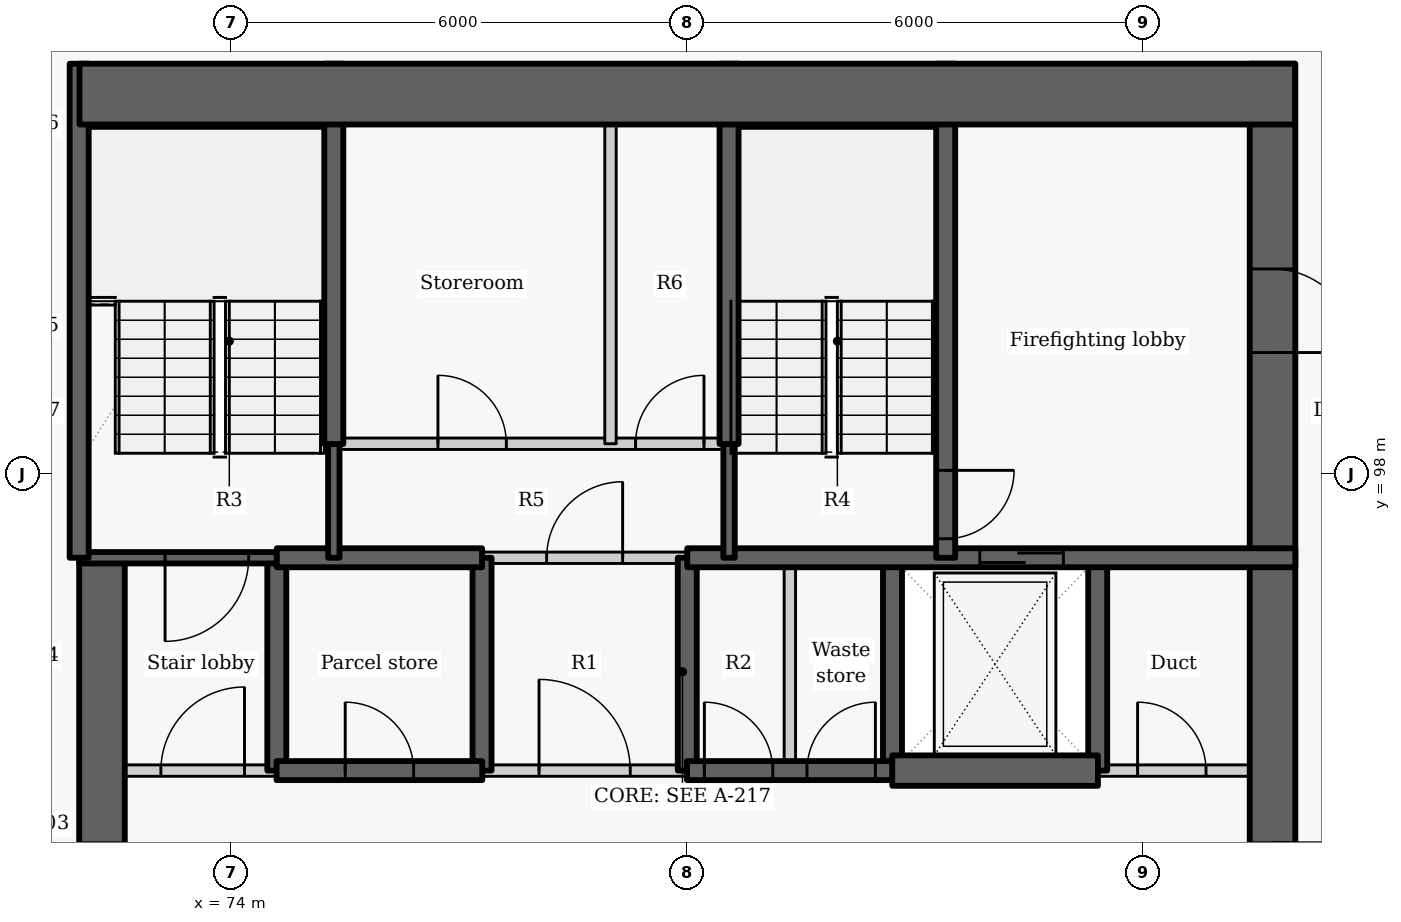
"""IFC4 building model, lengths in metres.
Left out: names, types, materials, properties, quantities, classifications, styles, units other than length and angle.
Written with IfcOpenShell. Run it as: python <this file> out.ifc"""

import sys

from ifc_helpers import new_model, si_unit, direction, frame, frame_2d, origin, place, context, subcontext, project, spatial, rectangle, extrude, element, fill, save


model = new_model("IFC4")
c1 = context("Model", 3, precision=1e-05, world=origin(), true_north=direction((0.0, 1.0)))
c2 = subcontext(c1, "Body", "Model", "MODEL_VIEW")
j1 = project(units=[si_unit("LENGTHUNIT", "METRE"), si_unit("PLANEANGLEUNIT", "RADIAN")], contexts=[c1])
p1 = place(None, origin())
s1 = spatial("IfcSite", under=j1, at=p1, CompositionType="ELEMENT")
p2 = place(p1, origin())
s2 = spatial("IfcBuilding", under=s1, at=p2, CompositionType="ELEMENT")
p3 = place(p2, frame((0.0, 0.0, 81.0)))
s3 = spatial("IfcBuildingStorey", under=s2, at=p3, CompositionType="ELEMENT", Elevation=81.0)
p4 = place(p3, frame((74.6, 94.1, -0.275), z_axis=(0.0, 0.0, 1.0), x_axis=(0.0, 1.0, 0.0)))
e1 = element("IfcWall", 1, at=p4, inside=s3, PredefinedType="SHEAR", context=c2, shape_type="SweptSolid", body=[
    extrude(rectangle(XDim=2.8, YDim=0.25, at=frame_2d((1.4, 0.0))), origin(), (0.0, 0.0, 1.0), 3.3),
])
p5 = place(p3, frame((72.3, 87.8, -0.275), z_axis=(0.0, 0.0, 1.0), x_axis=(0.0, 1.0, 0.0)))
e2 = element("IfcWall", 2, at=p5, inside=s3, PredefinedType="SHEAR", context=c2, shape_type="SweptSolid", body=[
    extrude(rectangle(XDim=9.1, YDim=0.6, at=frame_2d((4.55, 0.0))), origin(), (0.0, 0.0, 1.0), 3.3),
])
p6 = place(p5, frame((3.85, 0.0, 0.275)))
e3 = element("IfcOpeningElement", 3, at=p6, cuts=e2, PredefinedType="OPENING", context=c2, shape_type="SweptSolid", body=[
    extrude(rectangle(XDim=1.5, YDim=2.1, at=frame_2d((0.75, 1.05))), frame((0.0, 0.31, 0.0), z_axis=(0.0, -1.0, 0.0), x_axis=(1.0, 0.0, 0.0)), (0.0, 0.0, 1.0), 0.62),
])
for number, where, z_axis, x_axis in (
    (4, (77.3, 94.1, -0.275), (0.0, 0.0, 1.0), (0.0, 1.0, 0.0)),
    (5, (80.0, 94.1, -0.275), (0.0, 0.0, 1.0), (0.0, 1.0, 0.0)),
    (6, (82.7, 94.1, -0.275), (0.0, 0.0, 1.0), (0.0, 1.0, 0.0)),
    (7, (85.4, 94.1, -0.275), (0.0, 0.0, 1.0), (0.0, 1.0, 0.0)),
):
    element("IfcWall", number, at=place(p3, frame(where, z_axis=z_axis, x_axis=x_axis)), inside=s3, PredefinedType="SHEAR", context=c2, shape_type="SweptSolid", body=[
        extrude(rectangle(XDim=2.8, YDim=0.25, at=frame_2d((1.4, 0.0))), origin(), (0.0, 0.0, 1.0), 3.3),
    ])
p7 = place(p3, frame((87.7, 103.4, -0.275), z_axis=(0.0, 0.0, 1.0), x_axis=(0.0, -1.0, 0.0)))
e8 = element("IfcWall", 8, at=p7, inside=s3, PredefinedType="SHEAR", context=c2, shape_type="SweptSolid", body=[
    extrude(rectangle(XDim=15.6, YDim=0.6, at=frame_2d((7.8, 0.0))), origin(), (0.0, 0.0, 1.0), 3.3),
])
p8 = place(p7, frame((10.25, 0.0, 0.275)))
e9 = element("IfcOpeningElement", 9, at=p8, cuts=e8, PredefinedType="OPENING", context=c2, shape_type="SweptSolid", body=[
    extrude(rectangle(XDim=1.5, YDim=2.1, at=frame_2d((0.75, 1.05))), frame((0.0, 0.31, 0.0), z_axis=(0.0, -1.0, 0.0), x_axis=(1.0, 0.0, 0.0)), (0.0, 0.0, 1.0), 0.62),
])
p9 = place(p7, frame((2.7, 0.0, 0.275)))
e10 = element("IfcOpeningElement", 10, at=p9, cuts=e8, PredefinedType="OPENING", context=c2, shape_type="SweptSolid", body=[
    extrude(rectangle(XDim=1.1, YDim=2.1, at=frame_2d((0.55, 1.05))), frame((0.0, 0.31, 0.0), z_axis=(0.0, -1.0, 0.0), x_axis=(1.0, 0.0, 0.0)), (0.0, 0.0, 1.0), 0.62),
])
p10 = place(p3, frame((72.0, 94.1, 0.0), z_axis=(0.0, 0.0, 1.0), x_axis=(1.0, 0.0, 0.0)))
e11 = element("IfcWall", 11, at=p10, inside=s3, PredefinedType="PARTITIONING", context=c2, shape_type="SweptSolid", body=[
    extrude(rectangle(XDim=2.603, YDim=0.15, at=frame_2d((1.302, 0.0))), origin(), (0.0, 0.0, 1.0), 3.025),
])
p11 = place(p10, frame((1.075, 0.0, 0.0)))
e12 = element("IfcOpeningElement", 12, at=p11, cuts=e11, PredefinedType="OPENING", context=c2, shape_type="SweptSolid", body=[
    extrude(rectangle(XDim=1.1, YDim=2.1, at=frame_2d((0.55, 1.05))), frame((0.0, 0.085, 0.0), z_axis=(0.0, -1.0, 0.0), x_axis=(1.0, 0.0, 0.0)), (0.0, 0.0, 1.0), 0.17),
])
p12 = place(p3, frame((77.297, 94.1, 0.0), z_axis=(0.0, 0.0, 1.0), x_axis=(1.0, 0.0, 0.0)))
e13 = element("IfcWall", 13, at=p12, inside=s3, PredefinedType="PARTITIONING", context=c2, shape_type="SweptSolid", body=[
    extrude(rectangle(XDim=2.706, YDim=0.15, at=frame_2d((1.353, 0.0))), origin(), (0.0, 0.0, 1.0), 3.025),
])
p13 = place(p12, frame((0.753, 0.0, 0.0)))
e14 = element("IfcOpeningElement", 14, at=p13, cuts=e13, PredefinedType="OPENING", context=c2, shape_type="SweptSolid", body=[
    extrude(rectangle(XDim=1.2, YDim=2.1, at=frame_2d((0.6, 1.05))), frame((0.0, 0.085, 0.0), z_axis=(0.0, -1.0, 0.0), x_axis=(1.0, 0.0, 0.0)), (0.0, 0.0, 1.0), 0.17),
])
p14 = place(p3, frame((85.397, 94.1, 0.0), z_axis=(0.0, 0.0, 1.0), x_axis=(1.0, 0.0, 0.0)))
e15 = element("IfcWall", 15, at=p14, inside=s3, PredefinedType="PARTITIONING", context=c2, shape_type="SweptSolid", body=[
    extrude(rectangle(XDim=2.603, YDim=0.15, at=frame_2d((1.302, 0.0))), origin(), (0.0, 0.0, 1.0), 3.025),
])
p15 = place(p14, frame((0.528, 0.0, 0.0)))
e16 = element("IfcOpeningElement", 16, at=p15, cuts=e15, PredefinedType="OPENING", context=c2, shape_type="SweptSolid", body=[
    extrude(rectangle(XDim=0.9, YDim=2.1, at=frame_2d((0.45, 1.05))), frame((0.0, 0.085, 0.0), z_axis=(0.0, -1.0, 0.0), x_axis=(1.0, 0.0, 0.0)), (0.0, 0.0, 1.0), 0.17),
])
p16 = place(p3, frame((74.597, 94.1, -0.275), z_axis=(0.0, 0.0, 1.0), x_axis=(1.0, 0.0, 0.0)))
e17 = element("IfcWall", 17, at=p16, inside=s3, PredefinedType="SHEAR", context=c2, shape_type="SweptSolid", body=[
    extrude(rectangle(XDim=2.706, YDim=0.25, at=frame_2d((1.353, 0.0))), origin(), (0.0, 0.0, 1.0), 3.3),
])
p17 = place(p16, frame((0.903, 0.0, 0.275)))
e18 = element("IfcOpeningElement", 18, at=p17, cuts=e17, PredefinedType="OPENING", context=c2, shape_type="SweptSolid", body=[
    extrude(rectangle(XDim=0.9, YDim=2.1, at=frame_2d((0.45, 1.05))), frame((0.0, 0.135, 0.0), z_axis=(0.0, -1.0, 0.0), x_axis=(1.0, 0.0, 0.0)), (0.0, 0.0, 1.0), 0.27),
])
p18 = place(p3, frame((79.997, 94.1, -0.275), z_axis=(0.0, 0.0, 1.0), x_axis=(1.0, 0.0, 0.0)))
e19 = element("IfcWall", 19, at=p18, inside=s3, PredefinedType="SHEAR", context=c2, shape_type="SweptSolid", body=[
    extrude(rectangle(XDim=2.706, YDim=0.25, at=frame_2d((1.353, 0.0))), origin(), (0.0, 0.0, 1.0), 3.3),
])
p19 = place(p18, frame((0.228, 0.0, 0.275)))
e20 = element("IfcOpeningElement", 20, at=p19, cuts=e19, PredefinedType="OPENING", context=c2, shape_type="SweptSolid", body=[
    extrude(rectangle(XDim=0.9, YDim=2.1, at=frame_2d((0.45, 1.05))), frame((0.0, 0.135, 0.0), z_axis=(0.0, -1.0, 0.0), x_axis=(1.0, 0.0, 0.0)), (0.0, 0.0, 1.0), 0.27),
])
p20 = place(p18, frame((1.578, 0.0, 0.275)))
e21 = element("IfcOpeningElement", 21, at=p20, cuts=e19, PredefinedType="OPENING", context=c2, shape_type="SweptSolid", body=[
    extrude(rectangle(XDim=0.9, YDim=2.1, at=frame_2d((0.45, 1.05))), frame((0.0, 0.135, 0.0), z_axis=(0.0, -1.0, 0.0), x_axis=(1.0, 0.0, 0.0)), (0.0, 0.0, 1.0), 0.27),
])
p21 = place(p3, frame((82.697, 94.1, -0.275), z_axis=(0.0, 0.0, 1.0), x_axis=(1.0, 0.0, 0.0)))
e22 = element("IfcWall", 22, at=p21, inside=s3, PredefinedType="SHEAR", context=c2, shape_type="SweptSolid", body=[
    extrude(rectangle(XDim=2.706, YDim=0.4, at=frame_2d((1.353, 0.0))), origin(), (0.0, 0.0, 1.0), 3.3),
])
p22 = place(p3, frame((74.6, 96.9, -0.275), z_axis=(0.0, 0.0, 1.0), x_axis=(-1.0, 0.0, 0.0)))
e23 = element("IfcWall", 23, at=p22, inside=s3, PredefinedType="SHEAR", context=c2, shape_type="SweptSolid", body=[
    extrude(rectangle(XDim=2.6, YDim=0.15, at=frame_2d((1.3, 0.0))), origin(), (0.0, 0.0, 1.0), 3.3),
])
p23 = place(p22, frame((0.37, 0.0, 0.275)))
e24 = element("IfcOpeningElement", 24, at=p23, cuts=e23, PredefinedType="OPENING", context=c2, shape_type="SweptSolid", body=[
    extrude(rectangle(XDim=1.1, YDim=2.1, at=frame_2d((0.55, 1.05))), frame((0.0, 0.085, 0.0), z_axis=(0.0, -1.0, 0.0), x_axis=(1.0, 0.0, 0.0)), (0.0, 0.0, 1.0), 0.17),
])
p24 = place(p3, frame((74.6, 96.9, -0.275), z_axis=(0.0, 0.0, 1.0), x_axis=(1.0, 0.0, 0.0)))
e25 = element("IfcWall", 25, at=p24, inside=s3, PredefinedType="SHEAR", context=c2, shape_type="SweptSolid", body=[
    extrude(rectangle(XDim=2.7, YDim=0.25, at=frame_2d((1.35, 0.0))), origin(), (0.0, 0.0, 1.0), 3.3),
])
p25 = place(p3, frame((80.0, 96.9, -0.275), z_axis=(0.0, 0.0, 1.0), x_axis=(1.0, 0.0, 0.0)))
e26 = element("IfcWall", 26, at=p25, inside=s3, PredefinedType="SHEAR", context=c2, shape_type="SweptSolid", body=[
    extrude(rectangle(XDim=8.0, YDim=0.25, at=frame_2d((4.0, 0.0))), origin(), (0.0, 0.0, 1.0), 3.3),
])
p26 = place(p25, frame((3.849, 0.0, 0.275)))
e27 = element("IfcOpeningElement", 27, at=p26, cuts=e26, PredefinedType="OPENING", context=c2, shape_type="SweptSolid", body=[
    extrude(rectangle(XDim=1.1, YDim=2.1, at=frame_2d((0.55, 1.05))), frame((0.0, 0.135, 0.0), z_axis=(0.0, -1.0, 0.0), x_axis=(1.0, 0.0, 0.0)), (0.0, 0.0, 1.0), 0.27),
])
p27 = place(p3, frame((77.3, 96.9, 0.0), z_axis=(0.0, 0.0, 1.0), x_axis=(1.0, 0.0, 0.0)))
e28 = element("IfcWall", 28, at=p27, inside=s3, PredefinedType="PARTITIONING", context=c2, shape_type="SweptSolid", body=[
    extrude(rectangle(XDim=2.7, YDim=0.15, at=frame_2d((1.35, 0.0))), origin(), (0.0, 0.0, 1.0), 3.025),
])
p28 = place(p27, frame((0.85, 0.0, 0.0)))
e29 = element("IfcOpeningElement", 29, at=p28, cuts=e28, PredefinedType="OPENING", context=c2, shape_type="SweptSolid", body=[
    extrude(rectangle(XDim=1.0, YDim=2.1, at=frame_2d((0.5, 1.05))), frame((0.0, 0.085, 0.0), z_axis=(0.0, -1.0, 0.0), x_axis=(1.0, 0.0, 0.0)), (0.0, 0.0, 1.0), 0.17),
])
p29 = place(p3, frame((81.35, 94.1, 0.0), z_axis=(0.0, 0.0, 1.0), x_axis=(0.0, 1.0, 0.0)))
e30 = element("IfcWall", 30, at=p29, inside=s3, PredefinedType="PARTITIONING", context=c2, shape_type="SweptSolid", body=[
    extrude(rectangle(XDim=2.8, YDim=0.15, at=frame_2d((1.4, 0.0))), origin(), (0.0, 0.0, 1.0), 3.025),
])
p30 = place(p3, frame((75.35, 96.9, -0.275), z_axis=(0.0, 0.0, 1.0), x_axis=(0.0, 1.0, 0.0)))
e31 = element("IfcWall", 31, at=p30, inside=s3, PredefinedType="SHEAR", context=c2, shape_type="SweptSolid", body=[
    extrude(rectangle(XDim=1.503, YDim=0.15, at=frame_2d((0.751, 0.0))), origin(), (0.0, 0.0, 1.0), 3.3),
])
p31 = place(p3, frame((75.35, 98.397, -0.275), z_axis=(0.0, 0.0, 1.0), x_axis=(0.0, 1.0, 0.0)))
e32 = element("IfcWall", 32, at=p31, inside=s3, PredefinedType="SHEAR", context=c2, shape_type="SweptSolid", body=[
    extrude(rectangle(XDim=5.003, YDim=0.25, at=frame_2d((2.501, 0.0))), origin(), (0.0, 0.0, 1.0), 3.3),
])
p32 = place(p3, frame((72.0, 96.9, -0.275), z_axis=(0.0, 0.0, 1.0), x_axis=(0.0, 1.0, 0.0)))
e33 = element("IfcWall", 33, at=p32, inside=s3, PredefinedType="SHEAR", context=c2, shape_type="SweptSolid", body=[
    extrude(rectangle(XDim=6.5, YDim=0.25, at=frame_2d((3.25, 0.0))), origin(), (0.0, 0.0, 1.0), 3.3),
])
p33 = place(p3, frame((83.4, 103.4, -0.275), z_axis=(0.0, 0.0, 1.0), x_axis=(0.0, -1.0, 0.0)))
e34 = element("IfcWall", 34, at=p33, inside=s3, PredefinedType="SHEAR", context=c2, shape_type="SweptSolid", body=[
    extrude(rectangle(XDim=6.5, YDim=0.25, at=frame_2d((3.25, 0.0))), origin(), (0.0, 0.0, 1.0), 3.3),
])
p34 = place(p33, frame((5.35, 0.0, 0.275)))
e35 = element("IfcOpeningElement", 35, at=p34, cuts=e34, PredefinedType="OPENING", context=c2, shape_type="SweptSolid", body=[
    extrude(rectangle(XDim=0.9, YDim=2.1, at=frame_2d((0.45, 1.05))), frame((0.0, 0.135, 0.0), z_axis=(0.0, -1.0, 0.0), x_axis=(1.0, 0.0, 0.0)), (0.0, 0.0, 1.0), 0.27),
])
p35 = place(p3, frame((80.55, 96.9, -0.275), z_axis=(0.0, 0.0, 1.0), x_axis=(0.0, 1.0, 0.0)))
e36 = element("IfcWall", 36, at=p35, inside=s3, PredefinedType="SHEAR", context=c2, shape_type="SweptSolid", body=[
    extrude(rectangle(XDim=1.503, YDim=0.15, at=frame_2d((0.751, 0.0))), origin(), (0.0, 0.0, 1.0), 3.3),
])
p36 = place(p3, frame((80.55, 98.397, -0.275), z_axis=(0.0, 0.0, 1.0), x_axis=(0.0, 1.0, 0.0)))
e37 = element("IfcWall", 37, at=p36, inside=s3, PredefinedType="SHEAR", context=c2, shape_type="SweptSolid", body=[
    extrude(rectangle(XDim=5.003, YDim=0.25, at=frame_2d((2.501, 0.0))), origin(), (0.0, 0.0, 1.0), 3.3),
])
p37 = place(p3, frame((75.35, 98.4, 0.0), z_axis=(0.0, 0.0, 1.0), x_axis=(1.0, 0.0, 0.0)))
e38 = element("IfcWall", 38, at=p37, inside=s3, PredefinedType="PARTITIONING", context=c2, shape_type="SweptSolid", body=[
    extrude(rectangle(XDim=5.2, YDim=0.15, at=frame_2d((2.6, 0.0))), origin(), (0.0, 0.0, 1.0), 3.025),
])
p38 = place(p37, frame((1.37, 0.0, 0.0)))
e39 = element("IfcOpeningElement", 39, at=p38, cuts=e38, PredefinedType="OPENING", context=c2, shape_type="SweptSolid", body=[
    extrude(rectangle(XDim=0.9, YDim=2.1, at=frame_2d((0.45, 1.05))), frame((0.0, 0.085, 0.0), z_axis=(0.0, -1.0, 0.0), x_axis=(1.0, 0.0, 0.0)), (0.0, 0.0, 1.0), 0.17),
])
p39 = place(p37, frame((3.97, 0.0, 0.0)))
e40 = element("IfcOpeningElement", 40, at=p39, cuts=e38, PredefinedType="OPENING", context=c2, shape_type="SweptSolid", body=[
    extrude(rectangle(XDim=0.9, YDim=2.1, at=frame_2d((0.45, 1.05))), frame((0.0, 0.085, 0.0), z_axis=(0.0, -1.0, 0.0), x_axis=(1.0, 0.0, 0.0)), (0.0, 0.0, 1.0), 0.17),
])
p40 = place(p3, frame((78.99, 98.4, 0.0), z_axis=(0.0, 0.0, 1.0), x_axis=(0.0, 1.0, 0.0)))
e41 = element("IfcWall", 41, at=p40, inside=s3, PredefinedType="PARTITIONING", context=c2, shape_type="SweptSolid", body=[
    extrude(rectangle(XDim=5.0, YDim=0.15, at=frame_2d((2.5, 0.0))), origin(), (0.0, 0.0, 1.0), 3.025),
])
p41 = place(p3, frame((72.004, 103.0, -0.275), z_axis=(0.0, 0.0, 1.0), x_axis=(1.0, 0.0, 0.0)))
e42 = element("IfcWall", 42, at=p41, inside=s3, PredefinedType="SHEAR", context=c2, shape_type="SweptSolid", body=[
    extrude(rectangle(XDim=15.992, YDim=0.8, at=frame_2d((7.996, 0.0))), origin(), (0.0, 0.0, 1.0), 3.3),
])
p42 = place(p11, origin())
e43 = element("IfcDoor", 43, at=p42, inside=s3, OperationType="SINGLE_SWING_RIGHT", PredefinedType="DOOR", context=c2, shape_type="SweptSolid", body=[
    extrude(rectangle(XDim=1.1, YDim=2.1, at=frame_2d((0.55, 1.05))), frame((0.0, 0.025, 0.0), z_axis=(0.0, -1.0, 0.0), x_axis=(1.0, 0.0, 0.0)), (0.0, 0.0, 1.0), 0.05),
])
fill(e12, e43)
p43 = place(p17, origin())
e44 = element("IfcDoor", 44, at=p43, inside=s3, OperationType="SINGLE_SWING_LEFT", PredefinedType="DOOR", context=c2, shape_type="SweptSolid", body=[
    extrude(rectangle(XDim=0.9, YDim=2.1, at=frame_2d((0.45, 1.05))), frame((0.0, 0.025, 0.0), z_axis=(0.0, -1.0, 0.0), x_axis=(1.0, 0.0, 0.0)), (0.0, 0.0, 1.0), 0.05),
])
fill(e18, e44)
p44 = place(p13, origin())
e45 = element("IfcDoor", 45, at=p44, inside=s3, OperationType="DOUBLE_DOOR_SINGLE_SWING", PredefinedType="DOOR", context=c2, shape_type="SweptSolid", body=[
    extrude(rectangle(XDim=1.2, YDim=2.1, at=frame_2d((0.6, 1.05))), frame((0.0, 0.025, 0.0), z_axis=(0.0, -1.0, 0.0), x_axis=(1.0, 0.0, 0.0)), (0.0, 0.0, 1.0), 0.05),
])
fill(e14, e45)
p45 = place(p19, origin())
e46 = element("IfcDoor", 46, at=p45, inside=s3, OperationType="SINGLE_SWING_LEFT", PredefinedType="DOOR", context=c2, shape_type="SweptSolid", body=[
    extrude(rectangle(XDim=0.9, YDim=2.1, at=frame_2d((0.45, 1.05))), frame((0.0, 0.025, 0.0), z_axis=(0.0, -1.0, 0.0), x_axis=(1.0, 0.0, 0.0)), (0.0, 0.0, 1.0), 0.05),
])
fill(e20, e46)
p46 = place(p20, origin())
e47 = element("IfcDoor", 47, at=p46, inside=s3, OperationType="SINGLE_SWING_RIGHT", PredefinedType="DOOR", context=c2, shape_type="SweptSolid", body=[
    extrude(rectangle(XDim=0.9, YDim=2.1, at=frame_2d((0.45, 1.05))), frame((0.0, 0.025, 0.0), z_axis=(0.0, -1.0, 0.0), x_axis=(1.0, 0.0, 0.0)), (0.0, 0.0, 1.0), 0.05),
])
fill(e21, e47)
p47 = place(p26, origin())
e48 = element("IfcDoor", 48, at=p47, inside=s3, OperationType="SLIDING_TO_LEFT", PredefinedType="DOOR", context=c2, shape_type="SweptSolid", body=[
    extrude(rectangle(XDim=1.1, YDim=2.1, at=frame_2d((0.55, 1.05))), frame((0.0, 0.025, 0.0), z_axis=(0.0, -1.0, 0.0), x_axis=(1.0, 0.0, 0.0)), (0.0, 0.0, 1.0), 0.05),
])
fill(e27, e48)
p48 = place(p15, origin())
e49 = element("IfcDoor", 49, at=p48, inside=s3, OperationType="SINGLE_SWING_LEFT", PredefinedType="DOOR", context=c2, shape_type="SweptSolid", body=[
    extrude(rectangle(XDim=0.9, YDim=2.1, at=frame_2d((0.45, 1.05))), frame((0.0, 0.025, 0.0), z_axis=(0.0, -1.0, 0.0), x_axis=(1.0, 0.0, 0.0)), (0.0, 0.0, 1.0), 0.05),
])
fill(e16, e49)
p49 = place(p28, origin())
e50 = element("IfcDoor", 50, at=p49, inside=s3, OperationType="SINGLE_SWING_RIGHT", PredefinedType="DOOR", context=c2, shape_type="SweptSolid", body=[
    extrude(rectangle(XDim=1.0, YDim=2.1, at=frame_2d((0.5, 1.05))), frame((0.0, 0.025, 0.0), z_axis=(0.0, -1.0, 0.0), x_axis=(1.0, 0.0, 0.0)), (0.0, 0.0, 1.0), 0.05),
])
fill(e29, e50)
p50 = place(p38, origin())
e51 = element("IfcDoor", 51, at=p50, inside=s3, OperationType="SINGLE_SWING_LEFT", PredefinedType="DOOR", context=c2, shape_type="SweptSolid", body=[
    extrude(rectangle(XDim=0.9, YDim=2.1, at=frame_2d((0.45, 1.05))), frame((0.0, 0.025, 0.0), z_axis=(0.0, -1.0, 0.0), x_axis=(1.0, 0.0, 0.0)), (0.0, 0.0, 1.0), 0.05),
])
fill(e39, e51)
p51 = place(p39, origin())
e52 = element("IfcDoor", 52, at=p51, inside=s3, OperationType="SINGLE_SWING_RIGHT", PredefinedType="DOOR", context=c2, shape_type="SweptSolid", body=[
    extrude(rectangle(XDim=0.9, YDim=2.1, at=frame_2d((0.45, 1.05))), frame((0.0, 0.025, 0.0), z_axis=(0.0, -1.0, 0.0), x_axis=(1.0, 0.0, 0.0)), (0.0, 0.0, 1.0), 0.05),
])
fill(e40, e52)
p52 = place(p23, origin())
e53 = element("IfcDoor", 53, at=p52, inside=s3, OperationType="SINGLE_SWING_RIGHT", PredefinedType="DOOR", context=c2, shape_type="SweptSolid", body=[
    extrude(rectangle(XDim=1.1, YDim=2.1, at=frame_2d((0.55, 1.05))), frame((0.0, 0.025, 0.0), z_axis=(0.0, -1.0, 0.0), x_axis=(1.0, 0.0, 0.0)), (0.0, 0.0, 1.0), 0.05),
])
fill(e24, e53)
p53 = place(p34, origin())
e54 = element("IfcDoor", 54, at=p53, inside=s3, OperationType="SINGLE_SWING_LEFT", PredefinedType="DOOR", context=c2, shape_type="SweptSolid", body=[
    extrude(rectangle(XDim=0.9, YDim=2.1, at=frame_2d((0.45, 1.05))), frame((0.0, 0.025, 0.0), z_axis=(0.0, -1.0, 0.0), x_axis=(1.0, 0.0, 0.0)), (0.0, 0.0, 1.0), 0.05),
])
fill(e35, e54)
p54 = place(p6, origin())
e55 = element("IfcDoor", 55, at=p54, inside=s3, OperationType="DOUBLE_DOOR_SINGLE_SWING", PredefinedType="DOOR", context=c2, shape_type="SweptSolid", body=[
    extrude(rectangle(XDim=1.5, YDim=2.1, at=frame_2d((0.75, 1.05))), frame((0.0, 0.025, 0.0), z_axis=(0.0, -1.0, 0.0), x_axis=(1.0, 0.0, 0.0)), (0.0, 0.0, 1.0), 0.05),
])
fill(e3, e55)
p55 = place(p9, origin())
e56 = element("IfcDoor", 56, at=p55, inside=s3, OperationType="SINGLE_SWING_RIGHT", PredefinedType="DOOR", context=c2, shape_type="SweptSolid", body=[
    extrude(rectangle(XDim=1.1, YDim=2.1, at=frame_2d((0.55, 1.05))), frame((0.0, 0.025, 0.0), z_axis=(0.0, -1.0, 0.0), x_axis=(1.0, 0.0, 0.0)), (0.0, 0.0, 1.0), 0.05),
])
fill(e10, e56)
save(model, sys.argv[1])
